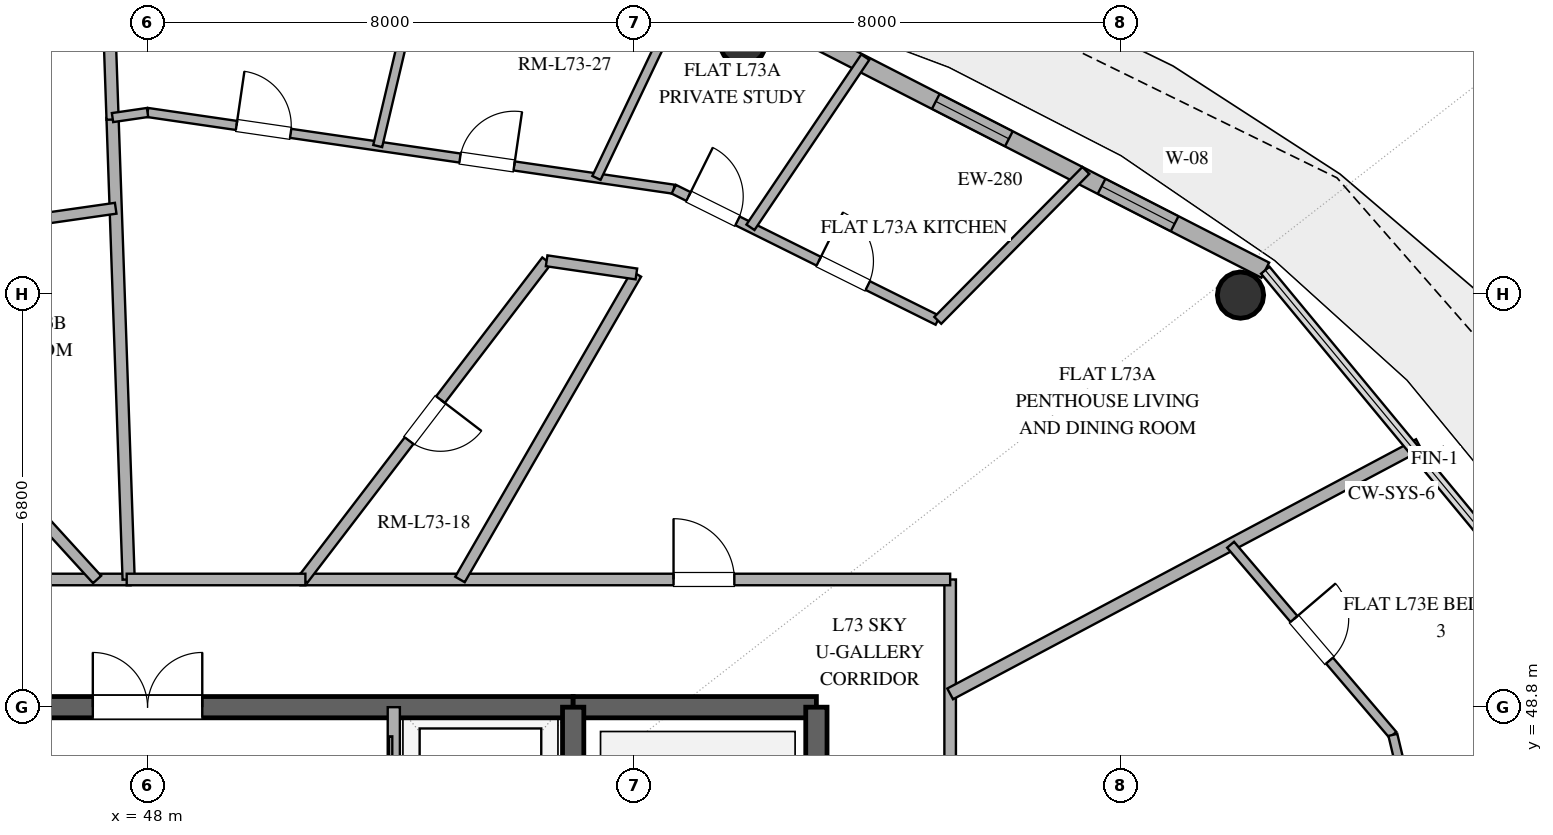
"""IFC4 building model, lengths in metres.
Left out: names, types, materials, properties, quantities, classifications, styles, units other than length and angle.
Written with IfcOpenShell. Run it as: python <this file> out.ifc"""

import sys

from ifc_helpers import new_model, si_unit, direction, frame, frame_2d, origin, origin_2d, place, context, subcontext, project, spatial, rectangle, hollow_circle, extrude, element, fill, save


model = new_model("IFC4")
c1 = context("Model", 3, precision=1e-05, world=origin(), true_north=direction((0.0, 1.0)))
c2 = subcontext(c1, "Body", "Model", "MODEL_VIEW")
j1 = project(units=[si_unit("LENGTHUNIT", "METRE"), si_unit("PLANEANGLEUNIT", "RADIAN")], contexts=[c1])
p1 = place(None, origin())
s1 = spatial("IfcSite", under=j1, at=p1, CompositionType="ELEMENT")
p2 = place(p1, origin())
s2 = spatial("IfcBuilding", under=s1, at=p2, CompositionType="ELEMENT")
p3 = place(p2, frame((0.0, 0.0, 283.8)))
s3 = spatial("IfcBuildingStorey", under=s2, at=p3, CompositionType="ELEMENT", Elevation=283.8)
p4 = place(p3, frame((41.0, 48.8, 0.0), z_axis=(0.0, 0.0, 1.0), x_axis=(1.0, 0.0, 0.0)))
e1 = element("IfcWall", 1, at=p4, inside=s3, PredefinedType="SHEAR", context=c2, shape_type="SweptSolid", body=[
    extrude(rectangle(XDim=14.0, YDim=0.35, at=frame_2d((7.0, 0.0))), origin(), (0.0, 0.0, 1.0), 3.37),
])
p5 = place(p4, frame((6.1, 0.0, 0.0)))
e2 = element("IfcOpeningElement", 2, at=p5, cuts=e1, PredefinedType="OPENING", context=c2, shape_type="SweptSolid", body=[
    extrude(rectangle(XDim=1.8, YDim=2.25, at=frame_2d((0.9, 1.125))), frame((0.0, 0.185, 0.0), z_axis=(0.0, -1.0, 0.0), x_axis=(1.0, 0.0, 0.0)), (0.0, 0.0, 1.0), 0.37),
])
p6 = place(p3, frame((55.0, 48.8, 0.0), z_axis=(0.0, 0.0, 1.0), x_axis=(1.0, 0.0, 0.0)))
e3 = element("IfcWall", 3, at=p6, inside=s3, PredefinedType="SHEAR", context=c2, shape_type="SweptSolid", body=[
    extrude(rectangle(XDim=4.0, YDim=0.35, at=frame_2d((2.0, 0.0))), origin(), (0.0, 0.0, 1.0), 3.37),
])
p7 = place(p3, frame((59.0, 35.2, 0.0), z_axis=(0.0, 0.0, 1.0), x_axis=(0.0, 1.0, 0.0)))
e4 = element("IfcWall", 4, at=p7, inside=s3, PredefinedType="SHEAR", context=c2, shape_type="SweptSolid", body=[
    extrude(rectangle(XDim=13.6, YDim=0.35, at=frame_2d((6.8, 0.0))), origin(), (0.0, 0.0, 1.0), 3.37),
])
p8 = place(p7, frame((1.5, 0.0, 0.0)))
e5 = element("IfcOpeningElement", 5, at=p8, cuts=e4, PredefinedType="OPENING", context=c2, shape_type="SweptSolid", body=[
    extrude(rectangle(XDim=1.2, YDim=2.15, at=frame_2d((0.6, 1.075))), frame((0.0, 0.185, 0.0), z_axis=(0.0, -1.0, 0.0), x_axis=(1.0, 0.0, 0.0)), (0.0, 0.0, 1.0), 0.37),
])
p9 = place(p3, frame((55.0, 35.2, 0.0), z_axis=(0.0, 0.0, 1.0), x_axis=(0.0, 1.0, 0.0)))
e6 = element("IfcWall", 6, at=p9, inside=s3, PredefinedType="SHEAR", context=c2, shape_type="SweptSolid", body=[
    extrude(rectangle(XDim=13.6, YDim=0.35, at=frame_2d((6.8, 0.0))), origin(), (0.0, 0.0, 1.0), 3.37),
])
p10 = place(p9, frame((1.15, 0.0, 0.0)))
e7 = element("IfcOpeningElement", 7, at=p10, cuts=e6, PredefinedType="OPENING", context=c2, shape_type="SweptSolid", body=[
    extrude(rectangle(XDim=1.1, YDim=2.2, at=frame_2d((0.55, 1.1))), frame((0.0, 0.185, 0.0), z_axis=(0.0, -1.0, 0.0), x_axis=(1.0, 0.0, 0.0)), (0.0, 0.0, 1.0), 0.37),
])
for number, where, z_axis, x_axis in (
    (8, (65.975, 55.576, 0.0), (0.0, 0.0, 1.0), (1.0, 0.0, 0.0)),
    (9, (57.791, 59.739, 0.0), (0.0, 0.0, 1.0), (1.0, 0.0, 0.0)),
):
    element("IfcColumn", number, at=place(p3, frame(where, z_axis=z_axis, x_axis=x_axis)), inside=s3, PredefinedType="COLUMN", context=c2, shape_type="SweptSolid", body=[
        extrude(hollow_circle(Radius=0.381, WallThickness=0.025, at=origin_2d()), origin(), (0.0, 0.0, 1.0), 3.37),
    ])
p11 = place(p3, frame((66.383, 55.987, 0.0), z_axis=(0.0, 0.0, 1.0), x_axis=(-0.890007394051, 0.455946091699, 0.0)))
e10 = element("IfcWall", 10, at=p11, inside=s3, PredefinedType="SOLIDWALL", context=c2, shape_type="SweptSolid", body=[
    extrude(rectangle(XDim=9.404, YDim=0.28, at=frame_2d((4.702, 0.0))), origin(), (0.0, 0.0, 1.0), 3.37),
])
p12 = place(p11, frame((1.675, 0.0, 0.85)))
e11 = element("IfcOpeningElement", 11, at=p12, cuts=e10, PredefinedType="OPENING", context=c2, shape_type="SweptSolid", body=[
    extrude(rectangle(XDim=1.35, YDim=1.8, at=frame_2d((0.675, 0.9))), frame((0.0, 0.15, 0.0), z_axis=(0.0, -1.0, 0.0), x_axis=(1.0, 0.0, 0.0)), (0.0, 0.0, 1.0), 0.3),
])
p13 = place(p11, frame((4.738, 0.0, 0.85)))
e12 = element("IfcOpeningElement", 12, at=p13, cuts=e10, PredefinedType="OPENING", context=c2, shape_type="SweptSolid", body=[
    extrude(rectangle(XDim=1.35, YDim=1.8, at=frame_2d((0.675, 0.9))), frame((0.0, 0.15, 0.0), z_axis=(0.0, -1.0, 0.0), x_axis=(1.0, 0.0, 0.0)), (0.0, 0.0, 1.0), 0.3),
])
p14 = place(p3, frame((52.05, 40.98, 0.0), z_axis=(0.0, 0.0, 1.0), x_axis=(0.0, 1.0, 0.0)))
e13 = element("IfcWall", 13, at=p14, inside=s3, PredefinedType="SOLIDWALL", context=c2, shape_type="SweptSolid", body=[
    extrude(rectangle(XDim=7.82, YDim=0.2, at=frame_2d((3.91, 0.0))), origin(), (0.0, 0.0, 1.0), 2.73),
])
p15 = place(p14, frame((0.65, 0.0, 0.0)))
e14 = element("IfcOpeningElement", 14, at=p15, cuts=e13, PredefinedType="OPENING", context=c2, shape_type="SweptSolid", body=[
    extrude(rectangle(XDim=1.1, YDim=2.2, at=frame_2d((0.55, 1.1))), frame((0.0, 0.11, 0.0), z_axis=(0.0, -1.0, 0.0), x_axis=(1.0, 0.0, 0.0)), (0.0, 0.0, 1.0), 0.22),
])
p16 = place(p14, frame((3.05, 0.0, 0.0)))
e15 = element("IfcOpeningElement", 15, at=p16, cuts=e13, PredefinedType="OPENING", context=c2, shape_type="SweptSolid", body=[
    extrude(rectangle(XDim=1.1, YDim=2.2, at=frame_2d((0.55, 1.1))), frame((0.0, 0.11, 0.0), z_axis=(0.0, -1.0, 0.0), x_axis=(1.0, 0.0, 0.0)), (0.0, 0.0, 1.0), 0.22),
])
p17 = place(p14, frame((5.6, 0.0, 0.0)))
e16 = element("IfcOpeningElement", 16, at=p17, cuts=e13, PredefinedType="OPENING", context=c2, shape_type="SweptSolid", body=[
    extrude(rectangle(XDim=1.2, YDim=2.2, at=frame_2d((0.6, 1.1))), frame((0.0, 0.11, 0.0), z_axis=(0.0, -1.0, 0.0), x_axis=(1.0, 0.0, 0.0)), (0.0, 0.0, 1.0), 0.22),
])
p18 = place(p3, frame((61.2, 50.9, 0.0), z_axis=(0.0, 0.0, 1.0), x_axis=(0.0, -1.0, 0.0)))
e17 = element("IfcWall", 17, at=p18, inside=s3, PredefinedType="PARTITIONING", context=c2, shape_type="SweptSolid", body=[
    extrude(rectangle(XDim=16.9, YDim=0.19, at=frame_2d((8.45, 0.0))), origin(), (0.0, 0.0, 1.0), 2.73),
])
p19 = place(p18, frame((8.873, 0.0, 0.0)))
e18 = element("IfcOpeningElement", 18, at=p19, cuts=e17, PredefinedType="OPENING", context=c2, shape_type="SweptSolid", body=[
    extrude(rectangle(XDim=1.0, YDim=2.2, at=frame_2d((0.5, 1.1))), frame((0.0, 0.105, 0.0), z_axis=(0.0, -1.0, 0.0), x_axis=(1.0, 0.0, 0.0)), (0.0, 0.0, 1.0), 0.21),
])
p20 = place(p3, frame((34.8, 50.9, 0.0), z_axis=(0.0, 0.0, 1.0), x_axis=(1.0, 0.0, 0.0)))
e19 = element("IfcWall", 19, at=p20, inside=s3, PredefinedType="PARTITIONING", context=c2, shape_type="SweptSolid", body=[
    extrude(rectangle(XDim=12.921, YDim=0.19, at=frame_2d((6.46, 0.0))), origin(), (0.0, 0.0, 1.0), 2.73),
])
p21 = place(p20, frame((5.707, 0.0, 0.0)))
e20 = element("IfcOpeningElement", 20, at=p21, cuts=e19, PredefinedType="OPENING", context=c2, shape_type="SweptSolid", body=[
    extrude(rectangle(XDim=1.0, YDim=2.2, at=frame_2d((0.5, 1.1))), frame((0.0, 0.105, 0.0), z_axis=(0.0, -1.0, 0.0), x_axis=(1.0, 0.0, 0.0)), (0.0, 0.0, 1.0), 0.21),
])
p22 = place(p3, frame((50.515, 50.9, 0.0), z_axis=(0.0, 0.0, 1.0), x_axis=(1.0, 0.0, 0.0)))
e21 = element("IfcWall", 21, at=p22, inside=s3, PredefinedType="PARTITIONING", context=c2, shape_type="SweptSolid", body=[
    extrude(rectangle(XDim=10.685, YDim=0.19, at=frame_2d((5.342, 0.0))), origin(), (0.0, 0.0, 1.0), 2.73),
])
p23 = place(p22, frame((6.135, 0.0, 0.0)))
e22 = element("IfcOpeningElement", 22, at=p23, cuts=e21, PredefinedType="OPENING", context=c2, shape_type="SweptSolid", body=[
    extrude(rectangle(XDim=1.0, YDim=2.2, at=frame_2d((0.5, 1.1))), frame((0.0, 0.105, 0.0), z_axis=(0.0, -1.0, 0.0), x_axis=(1.0, 0.0, 0.0)), (0.0, 0.0, 1.0), 0.21),
])
p24 = place(p3, frame((42.278, 56.261, 0.0), z_axis=(0.0, 0.0, 1.0), x_axis=(0.674096276867, -0.73864349284, 0.0)))
e23 = element("IfcWall", 23, at=p24, inside=s3, PredefinedType="PLUMBINGWALL", context=c2, shape_type="SweptSolid", body=[
    extrude(rectangle(XDim=7.258, YDim=0.18, at=frame_2d((3.629, 0.0))), origin(), (0.0, 0.0, 1.0), 2.73),
])
p25 = place(p24, frame((3.204, 0.0, 0.0)))
e24 = element("IfcOpeningElement", 24, at=p25, cuts=e23, PredefinedType="OPENING", context=c2, shape_type="SweptSolid", body=[
    extrude(rectangle(XDim=0.85, YDim=2.1, at=frame_2d((0.425, 1.05))), frame((0.0, 0.1, 0.0), z_axis=(0.0, -1.0, 0.0), x_axis=(1.0, 0.0, 0.0)), (0.0, 0.0, 1.0), 0.2),
])
p26 = place(p3, frame((54.564, 56.141, 0.0), z_axis=(0.0, 0.0, 1.0), x_axis=(-0.607456974677, -0.794352581614, 0.0)))
e25 = element("IfcWall", 25, at=p26, inside=s3, PredefinedType="PLUMBINGWALL", context=c2, shape_type="SweptSolid", body=[
    extrude(rectangle(XDim=6.598, YDim=0.18, at=frame_2d((3.299, 0.0))), origin(), (0.0, 0.0, 1.0), 2.73),
])
p27 = place(p26, frame((2.874, 0.0, 0.0)))
e26 = element("IfcOpeningElement", 26, at=p27, cuts=e25, PredefinedType="OPENING", context=c2, shape_type="SweptSolid", body=[
    extrude(rectangle(XDim=0.85, YDim=2.1, at=frame_2d((0.425, 1.05))), frame((0.0, 0.1, 0.0), z_axis=(0.0, -1.0, 0.0), x_axis=(1.0, 0.0, 0.0)), (0.0, 0.0, 1.0), 0.2),
])
p28 = place(p3, frame((47.689, 50.9, 0.0), z_axis=(0.0, 0.0, 1.0), x_axis=(-0.034882659784, 0.999391414835, 0.0)))
e27 = element("IfcWall", 27, at=p28, inside=s3, PredefinedType="PARTITIONING", context=c2, shape_type="SweptSolid", body=[
    extrude(rectangle(XDim=7.601, YDim=0.2, at=frame_2d((3.8, 0.0))), origin(), (0.0, 0.0, 1.0), 2.73),
])
p29 = place(p3, frame((53.138, 50.9, 0.0), z_axis=(0.0, 0.0, 1.0), x_axis=(0.499985927882, 0.866033528173, 0.0)))
e28 = element("IfcWall", 28, at=p29, inside=s3, PredefinedType="PLUMBINGWALL", context=c2, shape_type="SweptSolid", body=[
    extrude(rectangle(XDim=5.802, YDim=0.18, at=frame_2d((2.901, 0.0))), origin(), (0.0, 0.0, 1.0), 2.73),
])
p30 = place(p3, frame((68.909, 53.118, 0.0), z_axis=(0.0, 0.0, 1.0), x_axis=(-0.882939716422, -0.469486375909, 0.0)))
e29 = element("IfcWall", 29, at=p30, inside=s3, PredefinedType="PARTITIONING", context=c2, shape_type="SweptSolid", body=[
    extrude(rectangle(XDim=8.732, YDim=0.2, at=frame_2d((4.366, 0.0))), origin(), (0.0, 0.0, 1.0), 2.73),
])
p31 = place(p3, frame((47.476, 57.005, 0.0), z_axis=(0.0, 0.0, 1.0), x_axis=(-0.989922511169, -0.141610105153, 0.0)))
e30 = element("IfcWall", 30, at=p31, inside=s3, PredefinedType="PLUMBINGWALL", context=c2, shape_type="SweptSolid", body=[
    extrude(rectangle(XDim=5.251, YDim=0.18, at=frame_2d((2.626, 0.0))), origin(), (0.0, 0.0, 1.0), 2.73),
])
p32 = place(p3, frame((65.812, 51.471, 0.0), z_axis=(0.0, 0.0, 1.0), x_axis=(0.649224667474, -0.760596694145, 0.0)))
e31 = element("IfcWall", 31, at=p32, inside=s3, PredefinedType="PARTITIONING", context=c2, shape_type="SweptSolid", body=[
    extrude(rectangle(XDim=4.11, YDim=0.15, at=frame_2d((2.055, 0.0))), origin(), (0.0, 0.0, 1.0), 2.73),
])
p33 = place(p32, frame((1.605, 0.0, 0.0)))
e32 = element("IfcOpeningElement", 32, at=p33, cuts=e31, PredefinedType="OPENING", context=c2, shape_type="SweptSolid", body=[
    extrude(rectangle(XDim=0.9, YDim=2.1, at=frame_2d((0.45, 1.05))), frame((0.0, 0.085, 0.0), z_axis=(0.0, -1.0, 0.0), x_axis=(1.0, 0.0, 0.0)), (0.0, 0.0, 1.0), 0.17),
])
p34 = place(p3, frame((48.0, 58.58, 0.0), z_axis=(0.0, 0.0, 1.0), x_axis=(0.989536136377, -0.144285254977, 0.0)))
e33 = element("IfcWall", 33, at=p34, inside=s3, PredefinedType="PARTITIONING", context=c2, shape_type="SweptSolid", body=[
    extrude(rectangle(XDim=8.746, YDim=0.15, at=frame_2d((4.373, 0.0))), origin(), (0.0, 0.0, 1.0), 2.73),
])
p35 = place(p34, frame((1.479, 0.0, 0.0)))
e34 = element("IfcOpeningElement", 34, at=p35, cuts=e33, PredefinedType="OPENING", context=c2, shape_type="SweptSolid", body=[
    extrude(rectangle(XDim=0.9, YDim=2.1, at=frame_2d((0.45, 1.05))), frame((0.0, 0.085, 0.0), z_axis=(0.0, -1.0, 0.0), x_axis=(1.0, 0.0, 0.0)), (0.0, 0.0, 1.0), 0.17),
])
p36 = place(p34, frame((5.193, 0.0, 0.0)))
e35 = element("IfcOpeningElement", 35, at=p36, cuts=e33, PredefinedType="OPENING", context=c2, shape_type="SweptSolid", body=[
    extrude(rectangle(XDim=0.9, YDim=2.1, at=frame_2d((0.45, 1.05))), frame((0.0, 0.085, 0.0), z_axis=(0.0, -1.0, 0.0), x_axis=(1.0, 0.0, 0.0)), (0.0, 0.0, 1.0), 0.17),
])
p37 = place(p3, frame((68.481, 48.345, 0.0), z_axis=(0.0, 0.0, 1.0), x_axis=(0.232298462197, -0.972644551962, 0.0)))
e36 = element("IfcWall", 36, at=p37, inside=s3, PredefinedType="PARTITIONING", context=c2, shape_type="SweptSolid", body=[
    extrude(rectangle(XDim=6.523, YDim=0.15, at=frame_2d((3.262, 0.0))), origin(), (0.0, 0.0, 1.0), 2.73),
])
p38 = place(p3, frame((56.655, 57.318, 0.0), z_axis=(0.0, 0.0, 1.0), x_axis=(0.895572412961, -0.44491578208, 0.0)))
e37 = element("IfcWall", 37, at=p38, inside=s3, PredefinedType="PLUMBINGWALL", context=c2, shape_type="SweptSolid", body=[
    extrude(rectangle(XDim=4.848, YDim=0.16, at=frame_2d((2.424, 0.0))), origin(), (0.0, 0.0, 1.0), 2.73),
])
p39 = place(p38, frame((2.662, 0.0, 0.0)))
e38 = element("IfcOpeningElement", 38, at=p39, cuts=e37, PredefinedType="OPENING", context=c2, shape_type="SweptSolid", body=[
    extrude(rectangle(XDim=0.9, YDim=2.1, at=frame_2d((0.45, 1.05))), frame((0.0, 0.09, 0.0), z_axis=(0.0, -1.0, 0.0), x_axis=(1.0, 0.0, 0.0)), (0.0, 0.0, 1.0), 0.18),
])
p40 = place(p38, frame((0.27, 0.0, 0.0)))
e39 = element("IfcOpeningElement", 39, at=p40, cuts=e37, PredefinedType="OPENING", context=c2, shape_type="SweptSolid", body=[
    extrude(rectangle(XDim=0.9, YDim=2.1, at=frame_2d((0.45, 1.05))), frame((0.0, 0.09, 0.0), z_axis=(0.0, -1.0, 0.0), x_axis=(1.0, 0.0, 0.0)), (0.0, 0.0, 1.0), 0.18),
])
p41 = place(p3, frame((60.997, 55.161, 0.0), z_axis=(0.0, 0.0, 1.0), x_axis=(0.702618919802, 0.711566338113, 0.0)))
e40 = element("IfcWall", 40, at=p41, inside=s3, PredefinedType="PLUMBINGWALL", context=c2, shape_type="SweptSolid", body=[
    extrude(rectangle(XDim=3.465, YDim=0.16, at=frame_2d((1.733, 0.0))), origin(), (0.0, 0.0, 1.0), 2.73),
])
p42 = place(p3, frame((56.842, 60.566, 0.0), z_axis=(0.0, 0.0, 1.0), x_axis=(-0.429975480416, -0.902840565239, 0.0)))
e41 = element("IfcWall", 41, at=p42, inside=s3, PredefinedType="PARTITIONING", context=c2, shape_type="SweptSolid", body=[
    extrude(rectangle(XDim=3.393, YDim=0.15, at=frame_2d((1.696, 0.0))), origin(), (0.0, 0.0, 1.0), 2.73),
])
p43 = place(p3, frame((59.804, 59.49, 0.0), z_axis=(0.0, 0.0, 1.0), x_axis=(-0.559397095435, -0.828899806743, 0.0)))
e42 = element("IfcWall", 42, at=p43, inside=s3, PredefinedType="PLUMBINGWALL", context=c2, shape_type="SweptSolid", body=[
    extrude(rectangle(XDim=3.376, YDim=0.16, at=frame_2d((1.688, 0.0))), origin(), (0.0, 0.0, 1.0), 2.73),
])
p44 = place(p3, frame((47.309, 61.797, 0.0), z_axis=(0.0, 0.0, 1.0), x_axis=(0.034921182562, -0.999390069497, 0.0)))
e43 = element("IfcWall", 43, at=p44, inside=s3, PredefinedType="PARTITIONING", context=c2, shape_type="SweptSolid", body=[
    extrude(rectangle(XDim=3.335, YDim=0.2, at=frame_2d((1.667, 0.0))), origin(), (0.0, 0.0, 1.0), 2.73),
])
p45 = place(p3, frame((51.785, 58.028, 0.0), z_axis=(0.0, 0.0, 1.0), x_axis=(0.2298279545, 0.973231273301, 0.0)))
e44 = element("IfcWall", 44, at=p45, inside=s3, PredefinedType="PARTITIONING", context=c2, shape_type="SweptSolid", body=[
    extrude(rectangle(XDim=3.278, YDim=0.15, at=frame_2d((1.639, 0.0))), origin(), (0.0, 0.0, 1.0), 2.73),
])
p46 = place(p3, frame((47.657, 50.9, 0.0), z_axis=(0.0, 0.0, 1.0), x_axis=(1.0, 0.0, 0.0)))
e45 = element("IfcWall", 45, at=p46, inside=s3, PredefinedType="PARTITIONING", context=c2, shape_type="SweptSolid", body=[
    extrude(rectangle(XDim=2.939, YDim=0.19, at=frame_2d((1.469, 0.0))), origin(), (0.0, 0.0, 1.0), 2.73),
])
p47 = place(p3, frame((56.039, 55.925, 0.0), z_axis=(0.0, 0.0, 1.0), x_axis=(-0.989402061703, 0.14520179165, 0.0)))
e46 = element("IfcWall", 46, at=p47, inside=s3, PredefinedType="PLUMBINGWALL", context=c2, shape_type="SweptSolid", body=[
    extrude(rectangle(XDim=1.491, YDim=0.18, at=frame_2d((0.746, 0.0))), origin(), (0.0, 0.0, 1.0), 2.73),
])
p48 = place(p3, frame((47.424, 58.496, 0.0), z_axis=(0.0, 0.0, 1.0), x_axis=(0.989534228924, 0.144298336053, 0.0)))
e47 = element("IfcWall", 47, at=p48, inside=s3, PredefinedType="PARTITIONING", context=c2, shape_type="SweptSolid", body=[
    extrude(rectangle(XDim=0.582, YDim=0.15, at=frame_2d((0.291, 0.0))), origin(), (0.0, 0.0, 1.0), 2.73),
])
p49 = place(p12, origin())
e48 = element("IfcWindow", 48, at=p49, inside=s3, PartitioningType="SINGLE_PANEL", PredefinedType="WINDOW", context=c2, shape_type="SweptSolid", body=[
    extrude(rectangle(XDim=1.35, YDim=1.8, at=frame_2d((0.675, 0.9))), frame((0.0, 0.03, 0.0), z_axis=(0.0, -1.0, 0.0), x_axis=(1.0, 0.0, 0.0)), (0.0, 0.0, 1.0), 0.06),
])
fill(e11, e48)
p50 = place(p13, origin())
e49 = element("IfcWindow", 49, at=p50, inside=s3, PartitioningType="SINGLE_PANEL", PredefinedType="WINDOW", context=c2, shape_type="SweptSolid", body=[
    extrude(rectangle(XDim=1.35, YDim=1.8, at=frame_2d((0.675, 0.9))), frame((0.0, 0.03, 0.0), z_axis=(0.0, -1.0, 0.0), x_axis=(1.0, 0.0, 0.0)), (0.0, 0.0, 1.0), 0.06),
])
fill(e12, e49)
p51 = place(p5, origin())
e50 = element("IfcDoor", 50, at=p51, inside=s3, OperationType="DOUBLE_DOOR_SINGLE_SWING", PredefinedType="DOOR", context=c2, shape_type="SweptSolid", body=[
    extrude(rectangle(XDim=1.8, YDim=2.25, at=frame_2d((0.9, 1.125))), frame((0.0, 0.025, 0.0), z_axis=(0.0, -1.0, 0.0), x_axis=(1.0, 0.0, 0.0)), (0.0, 0.0, 1.0), 0.05),
])
fill(e2, e50)
p52 = place(p23, origin())
e51 = element("IfcDoor", 51, at=p52, inside=s3, OperationType="SINGLE_SWING_LEFT", PredefinedType="DOOR", context=c2, shape_type="SweptSolid", body=[
    extrude(rectangle(XDim=1.0, YDim=2.2, at=frame_2d((0.5, 1.1))), frame((0.0, 0.025, 0.0), z_axis=(0.0, -1.0, 0.0), x_axis=(1.0, 0.0, 0.0)), (0.0, 0.0, 1.0), 0.05),
])
fill(e22, e51)
p53 = place(p27, origin())
e52 = element("IfcDoor", 52, at=p53, inside=s3, OperationType="SINGLE_SWING_LEFT", PredefinedType="DOOR", context=c2, shape_type="SweptSolid", body=[
    extrude(rectangle(XDim=0.85, YDim=2.1, at=frame_2d((0.425, 1.05))), frame((0.0, 0.025, 0.0), z_axis=(0.0, -1.0, 0.0), x_axis=(1.0, 0.0, 0.0)), (0.0, 0.0, 1.0), 0.05),
])
fill(e26, e52)
p54 = place(p33, origin())
e53 = element("IfcDoor", 53, at=p54, inside=s3, OperationType="SINGLE_SWING_LEFT", PredefinedType="DOOR", context=c2, shape_type="SweptSolid", body=[
    extrude(rectangle(XDim=0.9, YDim=2.1, at=frame_2d((0.45, 1.05))), frame((0.0, 0.025, 0.0), z_axis=(0.0, -1.0, 0.0), x_axis=(1.0, 0.0, 0.0)), (0.0, 0.0, 1.0), 0.05),
])
fill(e32, e53)
p55 = place(p35, origin())
e54 = element("IfcDoor", 54, at=p55, inside=s3, OperationType="SINGLE_SWING_LEFT", PredefinedType="DOOR", context=c2, shape_type="SweptSolid", body=[
    extrude(rectangle(XDim=0.9, YDim=2.1, at=frame_2d((0.45, 1.05))), frame((0.0, 0.025, 0.0), z_axis=(0.0, -1.0, 0.0), x_axis=(1.0, 0.0, 0.0)), (0.0, 0.0, 1.0), 0.05),
])
fill(e34, e54)
p56 = place(p36, origin())
e55 = element("IfcDoor", 55, at=p56, inside=s3, OperationType="SINGLE_SWING_RIGHT", PredefinedType="DOOR", context=c2, shape_type="SweptSolid", body=[
    extrude(rectangle(XDim=0.9, YDim=2.1, at=frame_2d((0.45, 1.05))), frame((0.0, 0.025, 0.0), z_axis=(0.0, -1.0, 0.0), x_axis=(1.0, 0.0, 0.0)), (0.0, 0.0, 1.0), 0.05),
])
fill(e35, e55)
p57 = place(p39, origin())
e56 = element("IfcDoor", 56, at=p57, inside=s3, OperationType="SINGLE_SWING_LEFT", PredefinedType="DOOR", context=c2, shape_type="SweptSolid", body=[
    extrude(rectangle(XDim=0.9, YDim=2.1, at=frame_2d((0.45, 1.05))), frame((0.0, 0.025, 0.0), z_axis=(0.0, -1.0, 0.0), x_axis=(1.0, 0.0, 0.0)), (0.0, 0.0, 1.0), 0.05),
])
fill(e38, e56)
p58 = place(p40, origin())
e57 = element("IfcDoor", 57, at=p58, inside=s3, OperationType="SINGLE_SWING_LEFT", PredefinedType="DOOR", context=c2, shape_type="SweptSolid", body=[
    extrude(rectangle(XDim=0.9, YDim=2.1, at=frame_2d((0.45, 1.05))), frame((0.0, 0.025, 0.0), z_axis=(0.0, -1.0, 0.0), x_axis=(1.0, 0.0, 0.0)), (0.0, 0.0, 1.0), 0.05),
])
fill(e39, e57)
save(model, sys.argv[1])
